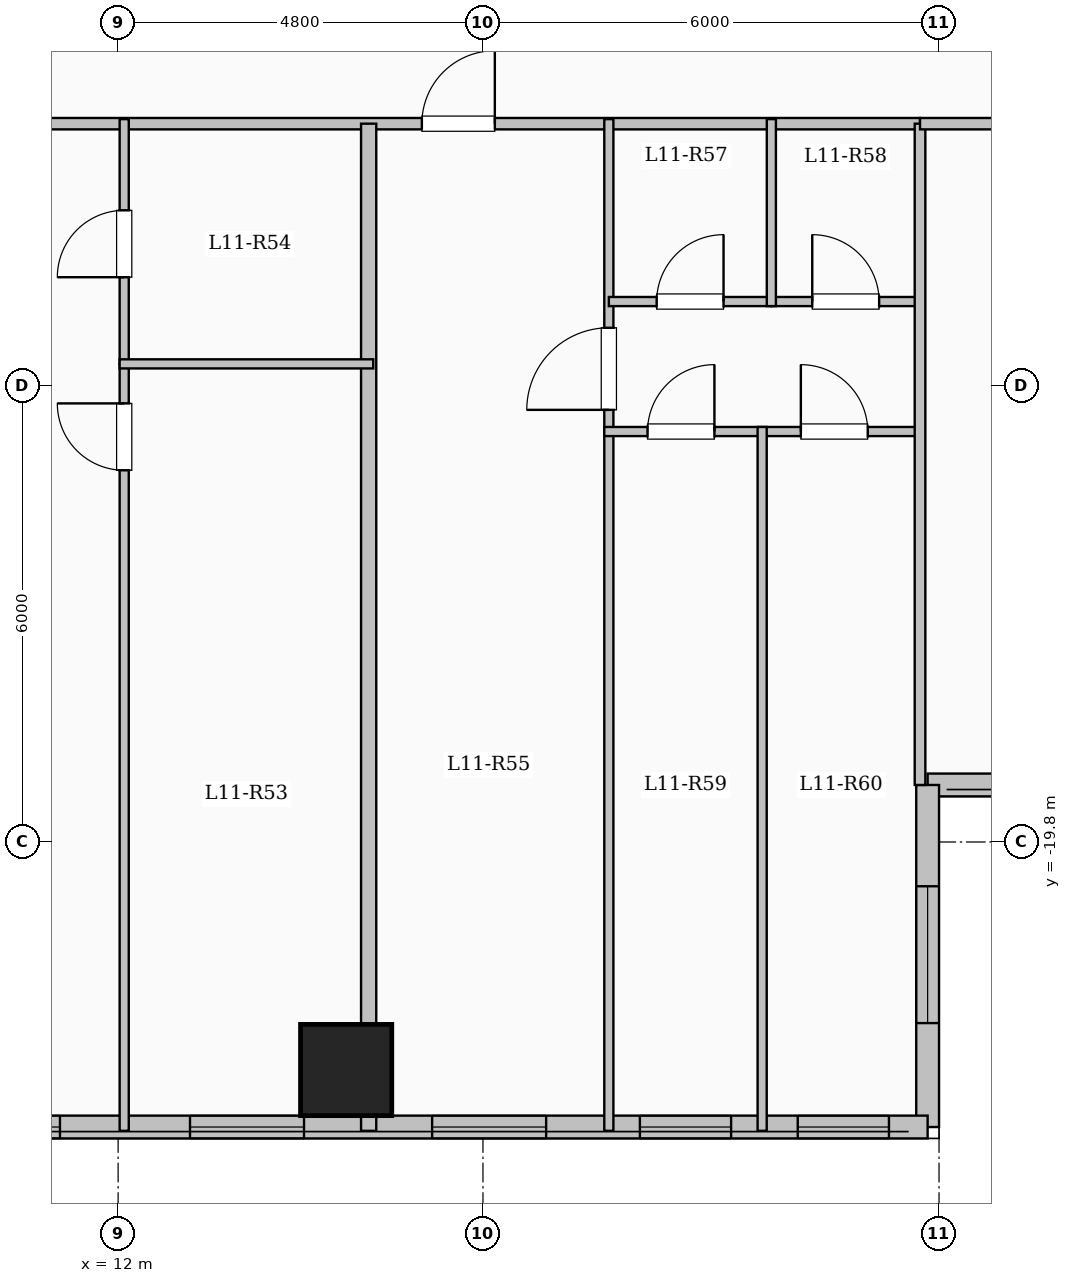
"""IFC4 building model, lengths in metres.
Left out: names, types, materials, properties, quantities, classifications, styles, units other than length and angle.
Written with IfcOpenShell. Run it as: python <this file> out.ifc"""

import sys

from ifc_helpers import new_model, si_unit, direction, frame, frame_2d, origin, origin_2d, place, context, subcontext, project, spatial, rectangle, extrude, element, fill, save


model = new_model("IFC4")
c1 = context("Model", 3, precision=1e-05, world=origin(), true_north=direction((0.0, 1.0)))
c2 = subcontext(c1, "Body", "Model", "MODEL_VIEW")
j1 = project(units=[si_unit("LENGTHUNIT", "METRE"), si_unit("PLANEANGLEUNIT", "RADIAN")], contexts=[c1])
p1 = place(None, origin())
s1 = spatial("IfcSite", under=j1, at=p1, CompositionType="ELEMENT")
p2 = place(p1, origin())
s2 = spatial("IfcBuilding", under=s1, at=p2, CompositionType="ELEMENT")
p3 = place(p2, frame((0.0, 0.0, 44.1)))
s3 = spatial("IfcBuildingStorey", under=s2, at=p3, CompositionType="ELEMENT", Elevation=44.1)
p4 = place(p3, frame((15.0, -22.8, 0.0), z_axis=(0.0, 0.0, 1.0), x_axis=(1.0, 0.0, 0.0)))
e1 = element("IfcColumn", 1, at=p4, inside=s3, PredefinedType="COLUMN", context=c2, shape_type="SweptSolid", body=[
    extrude(rectangle(XDim=1.2, YDim=1.2, at=origin_2d()), origin(), (0.0, 0.0, 1.0), 3.35),
])
p5 = place(p3, frame((28.65, -19.05, 0.0), z_axis=(0.0, 0.0, 1.0), x_axis=(-1.0, 0.0, 0.0)))
e2 = element("IfcWall", 2, at=p5, inside=s3, PredefinedType="SOLIDWALL", context=c2, shape_type="SweptSolid", body=[
    extrude(rectangle(XDim=6.0, YDim=0.3, at=frame_2d((3.0, 0.0))), origin(), (0.0, 0.0, 1.0), 3.1),
])
p6 = place(p5, frame((1.825, 0.0, 0.9)))
e3 = element("IfcOpeningElement", 3, at=p6, cuts=e2, PredefinedType="OPENING", context=c2, shape_type="SweptSolid", body=[
    extrude(rectangle(XDim=2.4, YDim=1.8, at=frame_2d((1.2, 0.9))), frame((0.0, 0.16, 0.0), z_axis=(0.0, -1.0, 0.0), x_axis=(1.0, 0.0, 0.0)), (0.0, 0.0, 1.0), 0.32),
])
p7 = place(p3, frame((22.65, -19.05, 0.0), z_axis=(0.0, 0.0, 1.0), x_axis=(0.0, -1.0, 0.0)))
e4 = element("IfcWall", 4, at=p7, inside=s3, PredefinedType="SOLIDWALL", context=c2, shape_type="SweptSolid", body=[
    extrude(rectangle(XDim=4.5, YDim=0.3, at=frame_2d((2.25, 0.0))), origin(), (0.0, 0.0, 1.0), 3.1),
])
p8 = place(p7, frame((1.333, 0.0, 0.9)))
e5 = element("IfcOpeningElement", 5, at=p8, cuts=e4, PredefinedType="OPENING", context=c2, shape_type="SweptSolid", body=[
    extrude(rectangle(XDim=1.8, YDim=1.65, at=frame_2d((0.9, 0.825))), frame((0.0, 0.16, 0.0), z_axis=(0.0, -1.0, 0.0), x_axis=(1.0, 0.0, 0.0)), (0.0, 0.0, 1.0), 0.32),
])
p9 = place(p3, frame((22.65, -23.55, 0.0), z_axis=(0.0, 0.0, 1.0), x_axis=(-1.0, 0.0, 0.0)))
e6 = element("IfcWall", 6, at=p9, inside=s3, PredefinedType="SOLIDWALL", context=c2, shape_type="SweptSolid", body=[
    extrude(rectangle(XDim=15.3, YDim=0.3, at=frame_2d((7.65, 0.0))), origin(), (0.0, 0.0, 1.0), 3.1),
])
p10 = place(p9, frame((0.509, 0.0, 0.95)))
e7 = element("IfcOpeningElement", 7, at=p10, cuts=e6, PredefinedType="OPENING", context=c2, shape_type="SweptSolid", body=[
    extrude(rectangle(XDim=1.2, YDim=1.5, at=frame_2d((0.6, 0.75))), frame((0.0, 0.16, 0.0), z_axis=(0.0, -1.0, 0.0), x_axis=(1.0, 0.0, 0.0)), (0.0, 0.0, 1.0), 0.32),
])
p11 = place(p9, frame((2.585, 0.0, 0.95)))
e8 = element("IfcOpeningElement", 8, at=p11, cuts=e6, PredefinedType="OPENING", context=c2, shape_type="SweptSolid", body=[
    extrude(rectangle(XDim=1.2, YDim=1.5, at=frame_2d((0.6, 0.75))), frame((0.0, 0.16, 0.0), z_axis=(0.0, -1.0, 0.0), x_axis=(1.0, 0.0, 0.0)), (0.0, 0.0, 1.0), 0.32),
])
p12 = place(p9, frame((5.019, 0.0, 0.9)))
e9 = element("IfcOpeningElement", 9, at=p12, cuts=e6, PredefinedType="OPENING", context=c2, shape_type="SweptSolid", body=[
    extrude(rectangle(XDim=1.5, YDim=1.65, at=frame_2d((0.75, 0.825))), frame((0.0, 0.16, 0.0), z_axis=(0.0, -1.0, 0.0), x_axis=(1.0, 0.0, 0.0)), (0.0, 0.0, 1.0), 0.32),
])
p13 = place(p9, frame((8.204, 0.0, 0.9)))
e10 = element("IfcOpeningElement", 10, at=p13, cuts=e6, PredefinedType="OPENING", context=c2, shape_type="SweptSolid", body=[
    extrude(rectangle(XDim=1.5, YDim=1.65, at=frame_2d((0.75, 0.825))), frame((0.0, 0.16, 0.0), z_axis=(0.0, -1.0, 0.0), x_axis=(1.0, 0.0, 0.0)), (0.0, 0.0, 1.0), 0.32),
])
p14 = place(p9, frame((11.415, 0.0, 0.9)))
e11 = element("IfcOpeningElement", 11, at=p14, cuts=e6, PredefinedType="OPENING", context=c2, shape_type="SweptSolid", body=[
    extrude(rectangle(XDim=1.8, YDim=1.65, at=frame_2d((0.9, 0.825))), frame((0.0, 0.16, 0.0), z_axis=(0.0, -1.0, 0.0), x_axis=(1.0, 0.0, 0.0)), (0.0, 0.0, 1.0), 0.32),
])
p15 = place(p9, frame((14.303, 0.0, 0.95)))
e12 = element("IfcOpeningElement", 12, at=p15, cuts=e6, PredefinedType="OPENING", context=c2, shape_type="SweptSolid", body=[
    extrude(rectangle(XDim=0.85, YDim=1.5, at=frame_2d((0.425, 0.75))), frame((0.0, 0.16, 0.0), z_axis=(0.0, -1.0, 0.0), x_axis=(1.0, 0.0, 0.0)), (0.0, 0.0, 1.0), 0.32),
])
p16 = place(p3, frame((8.55, -10.35, 0.0), z_axis=(0.0, 0.0, 1.0), x_axis=(1.0, 0.0, 0.0)))
e13 = element("IfcWall", 13, at=p16, inside=s3, PredefinedType="PARTITIONING", context=c2, shape_type="SweptSolid", body=[
    extrude(rectangle(XDim=14.0, YDim=0.15, at=frame_2d((7.0, 0.0))), origin(), (0.0, 0.0, 1.0), 3.1),
])
p17 = place(p16, frame((0.75, 0.0, 0.0)))
e14 = element("IfcOpeningElement", 14, at=p17, cuts=e13, PredefinedType="OPENING", context=c2, shape_type="SweptSolid", body=[
    extrude(rectangle(XDim=0.96, YDim=2.15, at=frame_2d((0.48, 1.075))), frame((0.0, 0.085, 0.0), z_axis=(0.0, -1.0, 0.0), x_axis=(1.0, 0.0, 0.0)), (0.0, 0.0, 1.0), 0.17),
])
p18 = place(p16, frame((7.446, 0.0, 0.0)))
e15 = element("IfcOpeningElement", 15, at=p18, cuts=e13, PredefinedType="OPENING", context=c2, shape_type="SweptSolid", body=[
    extrude(rectangle(XDim=0.96, YDim=2.15, at=frame_2d((0.48, 1.075))), frame((0.0, 0.085, 0.0), z_axis=(0.0, -1.0, 0.0), x_axis=(1.0, 0.0, 0.0)), (0.0, 0.0, 1.0), 0.17),
])
p19 = place(p3, frame((15.296, -23.6, 0.0), z_axis=(0.0, 0.0, 1.0), x_axis=(0.0, 1.0, 0.0)))
e16 = element("IfcWall", 16, at=p19, inside=s3, PredefinedType="SOLIDWALL", context=c2, shape_type="SweptSolid", body=[
    extrude(rectangle(XDim=13.25, YDim=0.2, at=frame_2d((6.625, 0.0))), origin(), (0.0, 0.0, 1.0), 2.435),
])
p20 = place(p3, frame((12.08, -23.6, 0.0), z_axis=(0.0, 0.0, 1.0), x_axis=(0.0, 1.0, 0.0)))
e17 = element("IfcWall", 17, at=p20, inside=s3, PredefinedType="PARTITIONING", context=c2, shape_type="SweptSolid", body=[
    extrude(rectangle(XDim=10.09, YDim=0.12, at=frame_2d((5.045, 0.0))), origin(), (0.0, 0.0, 1.0), 3.1),
])
p21 = place(p20, frame((8.69, 0.0, 0.0)))
e18 = element("IfcOpeningElement", 18, at=p21, cuts=e17, PredefinedType="OPENING", context=c2, shape_type="SweptSolid", body=[
    extrude(rectangle(XDim=0.88, YDim=2.1, at=frame_2d((0.44, 1.05))), frame((0.0, 0.07, 0.0), z_axis=(0.0, -1.0, 0.0), x_axis=(1.0, 0.0, 0.0)), (0.0, 0.0, 1.0), 0.14),
])
p22 = place(p3, frame((12.08, -13.51, 0.0), z_axis=(0.0, 0.0, 1.0), x_axis=(0.0, 1.0, 0.0)))
e19 = element("IfcWall", 19, at=p22, inside=s3, PredefinedType="PARTITIONING", context=c2, shape_type="SweptSolid", body=[
    extrude(rectangle(XDim=3.22, YDim=0.12, at=frame_2d((1.61, 0.0))), origin(), (0.0, 0.0, 1.0), 3.1),
])
p23 = place(p22, frame((1.14, 0.0, 0.0)))
e20 = element("IfcOpeningElement", 20, at=p23, cuts=e19, PredefinedType="OPENING", context=c2, shape_type="SweptSolid", body=[
    extrude(rectangle(XDim=0.88, YDim=2.1, at=frame_2d((0.44, 1.05))), frame((0.0, 0.07, 0.0), z_axis=(0.0, -1.0, 0.0), x_axis=(1.0, 0.0, 0.0)), (0.0, 0.0, 1.0), 0.14),
])
p24 = place(p3, frame((12.02, -13.51, 0.0), z_axis=(0.0, 0.0, 1.0), x_axis=(1.0, 0.0, 0.0)))
e21 = element("IfcWall", 21, at=p24, inside=s3, PredefinedType="PARTITIONING", context=c2, shape_type="SweptSolid", body=[
    extrude(rectangle(XDim=3.336, YDim=0.12, at=frame_2d((1.668, 0.0))), origin(), (0.0, 0.0, 1.0), 3.1),
])
p25 = place(p3, frame((18.456, -23.6, 0.0), z_axis=(0.0, 0.0, 1.0), x_axis=(0.0, 1.0, 0.0)))
e22 = element("IfcWall", 22, at=p25, inside=s3, PredefinedType="PARTITIONING", context=c2, shape_type="SweptSolid", body=[
    extrude(rectangle(XDim=13.31, YDim=0.12, at=frame_2d((6.655, 0.0))), origin(), (0.0, 0.0, 1.0), 3.1),
])
p26 = place(p25, frame((9.485, 0.0, 0.0)))
e23 = element("IfcOpeningElement", 23, at=p26, cuts=e22, PredefinedType="OPENING", context=c2, shape_type="SweptSolid", body=[
    extrude(rectangle(XDim=1.08, YDim=2.15, at=frame_2d((0.54, 1.075))), frame((0.0, 0.07, 0.0), z_axis=(0.0, -1.0, 0.0), x_axis=(1.0, 0.0, 0.0)), (0.0, 0.0, 1.0), 0.14),
])
p27 = place(p3, frame((18.456, -12.69, 0.0), z_axis=(0.0, 0.0, 1.0), x_axis=(1.0, 0.0, 0.0)))
e24 = element("IfcWall", 24, at=p27, inside=s3, PredefinedType="PARTITIONING", context=c2, shape_type="SweptSolid", body=[
    extrude(rectangle(XDim=2.138, YDim=0.12, at=frame_2d((1.069, 0.0))), origin(), (0.0, 0.0, 1.0), 3.1),
])
p28 = place(p27, frame((0.629, 0.0, 0.0)))
e25 = element("IfcOpeningElement", 25, at=p28, cuts=e24, PredefinedType="OPENING", context=c2, shape_type="SweptSolid", body=[
    extrude(rectangle(XDim=0.88, YDim=2.1, at=frame_2d((0.44, 1.05))), frame((0.0, 0.07, 0.0), z_axis=(0.0, -1.0, 0.0), x_axis=(1.0, 0.0, 0.0)), (0.0, 0.0, 1.0), 0.14),
])
p29 = place(p3, frame((20.594, -12.69, 0.0), z_axis=(0.0, 0.0, 1.0), x_axis=(1.0, 0.0, 0.0)))
e26 = element("IfcWall", 26, at=p29, inside=s3, PredefinedType="PARTITIONING", context=c2, shape_type="SweptSolid", body=[
    extrude(rectangle(XDim=1.956, YDim=0.12, at=frame_2d((0.978, 0.0))), origin(), (0.0, 0.0, 1.0), 3.1),
])
p30 = place(p29, frame((0.538, 0.0, 0.0)))
e27 = element("IfcOpeningElement", 27, at=p30, cuts=e26, PredefinedType="OPENING", context=c2, shape_type="SweptSolid", body=[
    extrude(rectangle(XDim=0.88, YDim=2.1, at=frame_2d((0.44, 1.05))), frame((0.0, 0.07, 0.0), z_axis=(0.0, -1.0, 0.0), x_axis=(1.0, 0.0, 0.0)), (0.0, 0.0, 1.0), 0.14),
])
p31 = place(p3, frame((18.396, -14.4, 0.0), z_axis=(0.0, 0.0, 1.0), x_axis=(1.0, 0.0, 0.0)))
e28 = element("IfcWall", 28, at=p31, inside=s3, PredefinedType="PARTITIONING", context=c2, shape_type="SweptSolid", body=[
    extrude(rectangle(XDim=4.214, YDim=0.12, at=frame_2d((2.107, 0.0))), origin(), (0.0, 0.0, 1.0), 3.1),
])
p32 = place(p31, frame((0.569, 0.0, 0.0)))
e29 = element("IfcOpeningElement", 29, at=p32, cuts=e28, PredefinedType="OPENING", context=c2, shape_type="SweptSolid", body=[
    extrude(rectangle(XDim=0.88, YDim=2.1, at=frame_2d((0.44, 1.05))), frame((0.0, 0.07, 0.0), z_axis=(0.0, -1.0, 0.0), x_axis=(1.0, 0.0, 0.0)), (0.0, 0.0, 1.0), 0.14),
])
p33 = place(p31, frame((2.586, 0.0, 0.0)))
e30 = element("IfcOpeningElement", 30, at=p33, cuts=e28, PredefinedType="OPENING", context=c2, shape_type="SweptSolid", body=[
    extrude(rectangle(XDim=0.88, YDim=2.1, at=frame_2d((0.44, 1.05))), frame((0.0, 0.07, 0.0), z_axis=(0.0, -1.0, 0.0), x_axis=(1.0, 0.0, 0.0)), (0.0, 0.0, 1.0), 0.14),
])
p34 = place(p3, frame((20.594, -12.75, 0.0), z_axis=(0.0, 0.0, 1.0), x_axis=(0.0, 1.0, 0.0)))
e31 = element("IfcWall", 31, at=p34, inside=s3, PredefinedType="PARTITIONING", context=c2, shape_type="SweptSolid", body=[
    extrude(rectangle(XDim=2.46, YDim=0.12, at=frame_2d((1.23, 0.0))), origin(), (0.0, 0.0, 1.0), 3.1),
])
p35 = place(p3, frame((20.473, -23.6, 0.0), z_axis=(0.0, 0.0, 1.0), x_axis=(0.0, 1.0, 0.0)))
e32 = element("IfcWall", 32, at=p35, inside=s3, PredefinedType="PARTITIONING", context=c2, shape_type="SweptSolid", body=[
    extrude(rectangle(XDim=9.26, YDim=0.12, at=frame_2d((4.63, 0.0))), origin(), (0.0, 0.0, 1.0), 3.1),
])
p36 = place(p3, frame((22.55, -19.05, 0.0), z_axis=(0.0, 0.0, 1.0), x_axis=(0.0, 1.0, 0.0)))
e33 = element("IfcWall", 33, at=p36, inside=s3, PredefinedType="PARTITIONING", context=c2, shape_type="SweptSolid", body=[
    extrude(rectangle(XDim=8.7, YDim=0.14, at=frame_2d((4.35, 0.0))), origin(), (0.0, 0.0, 1.0), 3.1),
])
p37 = place(p3, frame((22.55, -10.35, 0.0), z_axis=(0.0, 0.0, 1.0), x_axis=(1.0, 0.0, 0.0)))
e34 = element("IfcWall", 34, at=p37, inside=s3, PredefinedType="PARTITIONING", context=c2, shape_type="SweptSolid", body=[
    extrude(rectangle(XDim=6.13, YDim=0.15, at=frame_2d((3.065, 0.0))), origin(), (0.0, 0.0, 1.0), 3.1),
])
p38 = place(p37, frame((2.59, 0.0, 0.0)))
e35 = element("IfcOpeningElement", 35, at=p38, cuts=e34, PredefinedType="OPENING", context=c2, shape_type="SweptSolid", body=[
    extrude(rectangle(XDim=0.95, YDim=2.15, at=frame_2d((0.475, 1.075))), frame((0.0, 0.085, 0.0), z_axis=(0.0, -1.0, 0.0), x_axis=(1.0, 0.0, 0.0)), (0.0, 0.0, 1.0), 0.17),
])
p39 = place(p8, origin())
e36 = element("IfcWindow", 36, at=p39, inside=s3, PartitioningType="SINGLE_PANEL", PredefinedType="WINDOW", context=c2, shape_type="SweptSolid", body=[
    extrude(rectangle(XDim=1.8, YDim=1.65, at=frame_2d((0.9, 0.825))), frame((0.0, 0.03, 0.0), z_axis=(0.0, -1.0, 0.0), x_axis=(1.0, 0.0, 0.0)), (0.0, 0.0, 1.0), 0.06),
])
fill(e5, e36)
p40 = place(p10, origin())
e37 = element("IfcWindow", 37, at=p40, inside=s3, PartitioningType="SINGLE_PANEL", PredefinedType="WINDOW", context=c2, shape_type="SweptSolid", body=[
    extrude(rectangle(XDim=1.2, YDim=1.5, at=frame_2d((0.6, 0.75))), frame((0.0, 0.03, 0.0), z_axis=(0.0, -1.0, 0.0), x_axis=(1.0, 0.0, 0.0)), (0.0, 0.0, 1.0), 0.06),
])
fill(e7, e37)
p41 = place(p11, origin())
e38 = element("IfcWindow", 38, at=p41, inside=s3, PartitioningType="SINGLE_PANEL", PredefinedType="WINDOW", context=c2, shape_type="SweptSolid", body=[
    extrude(rectangle(XDim=1.2, YDim=1.5, at=frame_2d((0.6, 0.75))), frame((0.0, 0.03, 0.0), z_axis=(0.0, -1.0, 0.0), x_axis=(1.0, 0.0, 0.0)), (0.0, 0.0, 1.0), 0.06),
])
fill(e8, e38)
p42 = place(p12, origin())
e39 = element("IfcWindow", 39, at=p42, inside=s3, PartitioningType="SINGLE_PANEL", PredefinedType="WINDOW", context=c2, shape_type="SweptSolid", body=[
    extrude(rectangle(XDim=1.5, YDim=1.65, at=frame_2d((0.75, 0.825))), frame((0.0, 0.03, 0.0), z_axis=(0.0, -1.0, 0.0), x_axis=(1.0, 0.0, 0.0)), (0.0, 0.0, 1.0), 0.06),
])
fill(e9, e39)
p43 = place(p13, origin())
e40 = element("IfcWindow", 40, at=p43, inside=s3, PartitioningType="SINGLE_PANEL", PredefinedType="WINDOW", context=c2, shape_type="SweptSolid", body=[
    extrude(rectangle(XDim=1.5, YDim=1.65, at=frame_2d((0.75, 0.825))), frame((0.0, 0.03, 0.0), z_axis=(0.0, -1.0, 0.0), x_axis=(1.0, 0.0, 0.0)), (0.0, 0.0, 1.0), 0.06),
])
fill(e10, e40)
p44 = place(p14, origin())
e41 = element("IfcWindow", 41, at=p44, inside=s3, PartitioningType="SINGLE_PANEL", PredefinedType="WINDOW", context=c2, shape_type="SweptSolid", body=[
    extrude(rectangle(XDim=1.8, YDim=1.65, at=frame_2d((0.9, 0.825))), frame((0.0, 0.03, 0.0), z_axis=(0.0, -1.0, 0.0), x_axis=(1.0, 0.0, 0.0)), (0.0, 0.0, 1.0), 0.06),
])
fill(e11, e41)
p45 = place(p21, origin())
e42 = element("IfcDoor", 42, at=p45, inside=s3, OperationType="SINGLE_SWING_RIGHT", PredefinedType="DOOR", context=c2, shape_type="SweptSolid", body=[
    extrude(rectangle(XDim=0.88, YDim=2.1, at=frame_2d((0.44, 1.05))), frame((0.0, 0.025, 0.0), z_axis=(0.0, -1.0, 0.0), x_axis=(1.0, 0.0, 0.0)), (0.0, 0.0, 1.0), 0.05),
])
fill(e18, e42)
p46 = place(p23, origin())
e43 = element("IfcDoor", 43, at=p46, inside=s3, OperationType="SINGLE_SWING_LEFT", PredefinedType="DOOR", context=c2, shape_type="SweptSolid", body=[
    extrude(rectangle(XDim=0.88, YDim=2.1, at=frame_2d((0.44, 1.05))), frame((0.0, 0.025, 0.0), z_axis=(0.0, -1.0, 0.0), x_axis=(1.0, 0.0, 0.0)), (0.0, 0.0, 1.0), 0.05),
])
fill(e20, e43)
p47 = place(p18, origin())
e44 = element("IfcDoor", 44, at=p47, inside=s3, OperationType="SINGLE_SWING_RIGHT", PredefinedType="DOOR", context=c2, shape_type="SweptSolid", body=[
    extrude(rectangle(XDim=0.96, YDim=2.15, at=frame_2d((0.48, 1.075))), frame((0.0, 0.025, 0.0), z_axis=(0.0, -1.0, 0.0), x_axis=(1.0, 0.0, 0.0)), (0.0, 0.0, 1.0), 0.05),
])
fill(e15, e44)
p48 = place(p26, origin())
e45 = element("IfcDoor", 45, at=p48, inside=s3, OperationType="SINGLE_SWING_LEFT", PredefinedType="DOOR", context=c2, shape_type="SweptSolid", body=[
    extrude(rectangle(XDim=1.08, YDim=2.15, at=frame_2d((0.54, 1.075))), frame((0.0, 0.025, 0.0), z_axis=(0.0, -1.0, 0.0), x_axis=(1.0, 0.0, 0.0)), (0.0, 0.0, 1.0), 0.05),
])
fill(e23, e45)
p49 = place(p28, origin())
e46 = element("IfcDoor", 46, at=p49, inside=s3, OperationType="SINGLE_SWING_RIGHT", PredefinedType="DOOR", context=c2, shape_type="SweptSolid", body=[
    extrude(rectangle(XDim=0.88, YDim=2.1, at=frame_2d((0.44, 1.05))), frame((0.0, 0.025, 0.0), z_axis=(0.0, -1.0, 0.0), x_axis=(1.0, 0.0, 0.0)), (0.0, 0.0, 1.0), 0.05),
])
fill(e25, e46)
p50 = place(p30, origin())
e47 = element("IfcDoor", 47, at=p50, inside=s3, OperationType="SINGLE_SWING_LEFT", PredefinedType="DOOR", context=c2, shape_type="SweptSolid", body=[
    extrude(rectangle(XDim=0.88, YDim=2.1, at=frame_2d((0.44, 1.05))), frame((0.0, 0.025, 0.0), z_axis=(0.0, -1.0, 0.0), x_axis=(1.0, 0.0, 0.0)), (0.0, 0.0, 1.0), 0.05),
])
fill(e27, e47)
p51 = place(p32, origin())
e48 = element("IfcDoor", 48, at=p51, inside=s3, OperationType="SINGLE_SWING_RIGHT", PredefinedType="DOOR", context=c2, shape_type="SweptSolid", body=[
    extrude(rectangle(XDim=0.88, YDim=2.1, at=frame_2d((0.44, 1.05))), frame((0.0, 0.025, 0.0), z_axis=(0.0, -1.0, 0.0), x_axis=(1.0, 0.0, 0.0)), (0.0, 0.0, 1.0), 0.05),
])
fill(e29, e48)
p52 = place(p33, origin())
e49 = element("IfcDoor", 49, at=p52, inside=s3, OperationType="SINGLE_SWING_LEFT", PredefinedType="DOOR", context=c2, shape_type="SweptSolid", body=[
    extrude(rectangle(XDim=0.88, YDim=2.1, at=frame_2d((0.44, 1.05))), frame((0.0, 0.025, 0.0), z_axis=(0.0, -1.0, 0.0), x_axis=(1.0, 0.0, 0.0)), (0.0, 0.0, 1.0), 0.05),
])
fill(e30, e49)
save(model, sys.argv[1])
